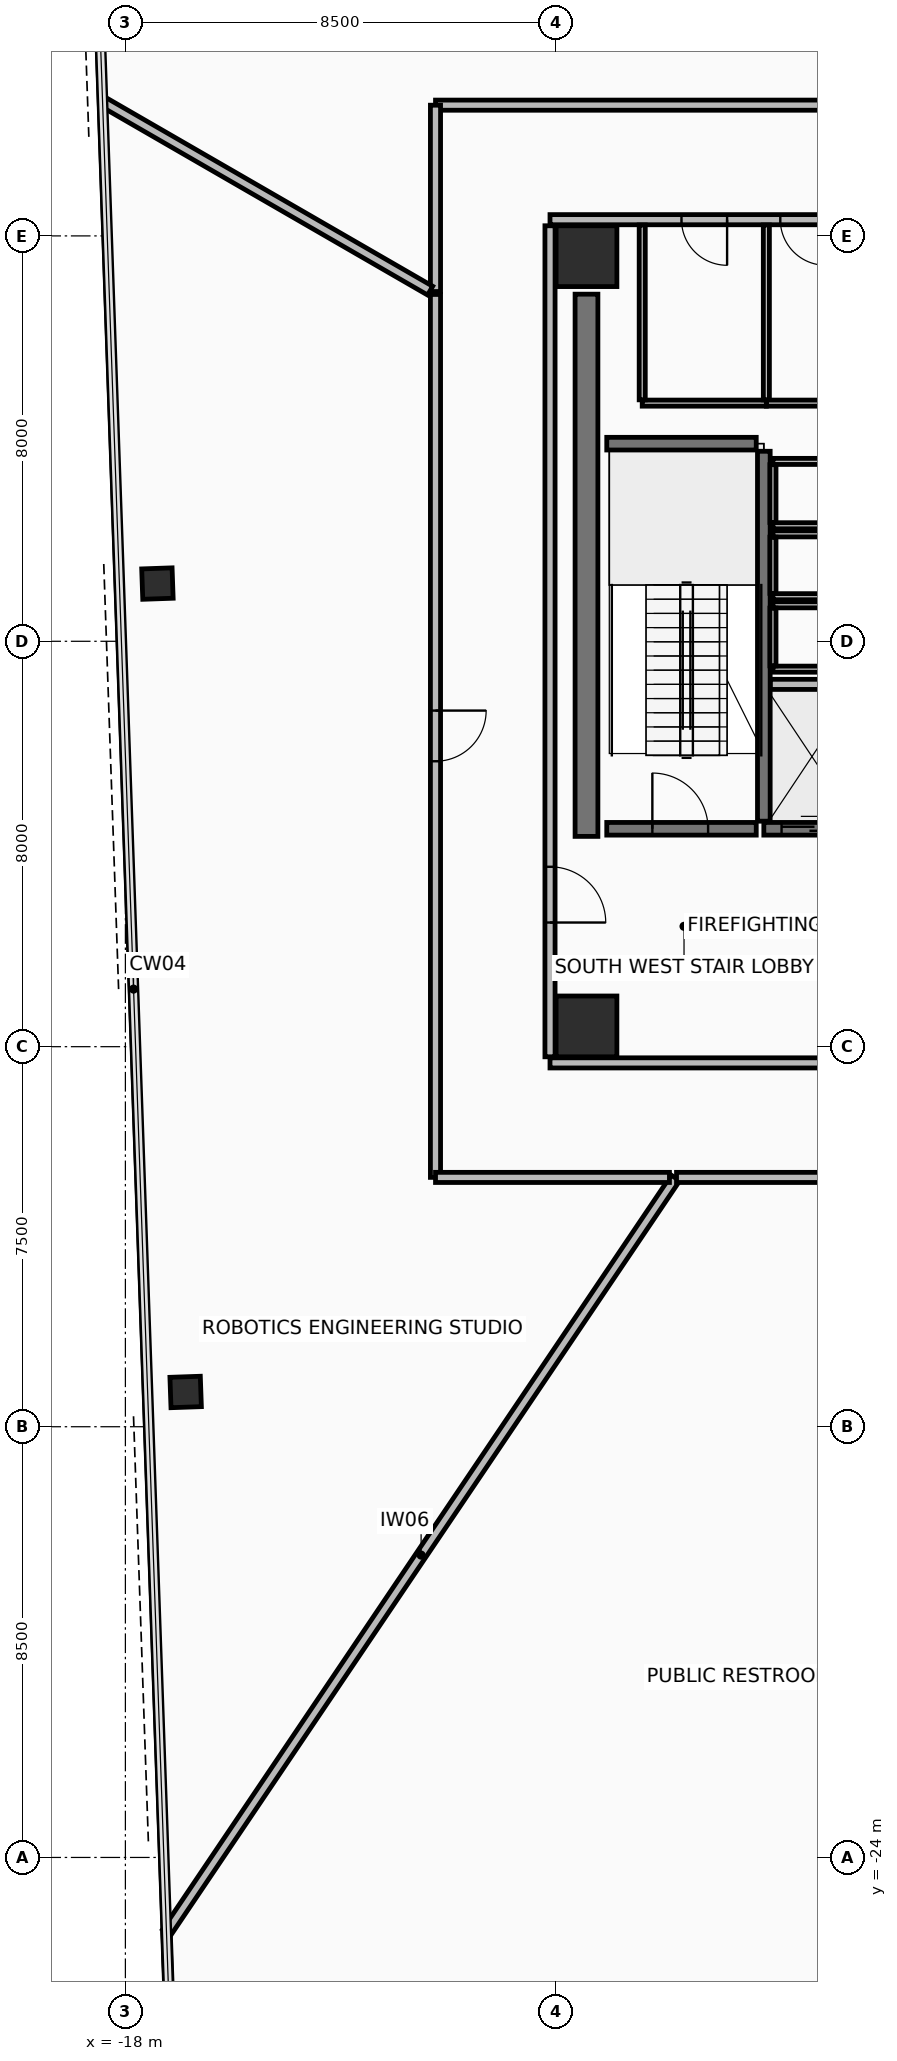
"""IFC4 building model, lengths in metres.
Left out: names, types, materials, properties, quantities, classifications, styles, units other than length and angle.
Written with IfcOpenShell. Run it as: python <this file> out.ifc"""

import sys

from ifc_helpers import new_model, si_unit, direction, frame, frame_2d, origin, origin_2d, place, context, subcontext, project, spatial, rectangle, hollow_rectangle, extrude, element, fill, save


model = new_model("IFC4")
c1 = context("Model", 3, precision=1e-05, world=origin(), true_north=direction((0.0, 1.0)))
c2 = subcontext(c1, "Body", "Model", "MODEL_VIEW")
j1 = project(units=[si_unit("LENGTHUNIT", "METRE"), si_unit("PLANEANGLEUNIT", "RADIAN")], contexts=[c1])
p1 = place(None, origin())
s1 = spatial("IfcSite", under=j1, at=p1, CompositionType="ELEMENT")
p2 = place(p1, origin())
s2 = spatial("IfcBuilding", under=s1, at=p2, CompositionType="ELEMENT")
p3 = place(p2, frame((0.0, 0.0, 160.4)))
s3 = spatial("IfcBuildingStorey", under=s2, at=p3, CompositionType="ELEMENT", Elevation=160.4)
for number, where, z_axis, x_axis in (
    (1, (-8.9, -7.6, 0.0), (0.0, 0.0, 1.0), (1.0, 0.0, 0.0)),
    (2, (-8.9, 7.6, 0.0), (0.0, 0.0, 1.0), (1.0, 0.0, 0.0)),
):
    element("IfcColumn", number, at=place(p3, frame(where, z_axis=z_axis, x_axis=x_axis)), inside=s3, PredefinedType="COLUMN", context=c2, shape_type="SweptSolid", body=[
        extrude(rectangle(XDim=1.2, YDim=1.2, at=origin_2d()), origin(), (0.0, 0.0, 1.0), 4.75),
    ])
for number, where, z_axis, x_axis in (
    (3, (-17.368, 1.139, 0.0), (0.0, 0.0, 1.0), (-0.035, 0.999, 0.0)),
    (4, (-16.811, -14.814, 0.0), (0.0, 0.0, 1.0), (-0.035, 0.999, 0.0)),
):
    element("IfcColumn", number, at=place(p3, frame(where, z_axis=z_axis, x_axis=x_axis)), inside=s3, PredefinedType="COLUMN", context=c2, shape_type="SweptSolid", body=[
        extrude(hollow_rectangle(XDim=0.6, YDim=0.6, WallThickness=0.036, at=origin_2d()), origin(), (0.0, 0.0, 1.0), 4.75),
    ])
p4 = place(p3, frame((-8.9, -3.85, 0.0), z_axis=(0.0, 0.0, 1.0), x_axis=(0.0, 1.0, 0.0)))
e5 = element("IfcWall", 5, at=p4, inside=s3, PredefinedType="SHEAR", context=c2, shape_type="SweptSolid", body=[
    extrude(rectangle(XDim=10.7, YDim=0.45, at=frame_2d((5.35, 0.0))), origin(), (0.0, 0.0, 1.0), 4.555),
])
p5 = place(p3, frame((-9.62, -8.32, 0.0), z_axis=(0.0, 0.0, 1.0), x_axis=(1.0, 0.0, 0.0)))
e6 = element("IfcWall", 6, at=p5, inside=s3, PredefinedType="PARTITIONING", context=c2, shape_type="SweptSolid", body=[
    extrude(rectangle(XDim=19.24, YDim=0.2, at=frame_2d((9.62, 0.0))), origin(), (0.0, 0.0, 1.0), 2.35),
])
p6 = place(p5, frame((8.57, 0.0, 0.0)))
e7 = element("IfcOpeningElement", 7, at=p6, cuts=e6, PredefinedType="OPENING", context=c2, shape_type="SweptSolid", body=[
    extrude(rectangle(XDim=0.9, YDim=2.1, at=frame_2d((0.45, 1.05))), frame((0.0, 0.11, 0.0), z_axis=(0.0, -1.0, 0.0), x_axis=(1.0, 0.0, 0.0)), (0.0, 0.0, 1.0), 0.22),
])
p7 = place(p5, frame((14.045, 0.0, 0.0)))
e8 = element("IfcOpeningElement", 8, at=p7, cuts=e6, PredefinedType="OPENING", context=c2, shape_type="SweptSolid", body=[
    extrude(rectangle(XDim=0.9, YDim=2.1, at=frame_2d((0.45, 1.05))), frame((0.0, 0.11, 0.0), z_axis=(0.0, -1.0, 0.0), x_axis=(1.0, 0.0, 0.0)), (0.0, 0.0, 1.0), 0.22),
])
p8 = place(p5, frame((15.995, 0.0, 0.0)))
e9 = element("IfcOpeningElement", 9, at=p8, cuts=e6, PredefinedType="OPENING", context=c2, shape_type="SweptSolid", body=[
    extrude(rectangle(XDim=0.9, YDim=2.1, at=frame_2d((0.45, 1.05))), frame((0.0, 0.11, 0.0), z_axis=(0.0, -1.0, 0.0), x_axis=(1.0, 0.0, 0.0)), (0.0, 0.0, 1.0), 0.22),
])
p9 = place(p3, frame((9.62, 8.32, 0.0), z_axis=(0.0, 0.0, 1.0), x_axis=(-1.0, 0.0, 0.0)))
e10 = element("IfcWall", 10, at=p9, inside=s3, PredefinedType="PARTITIONING", context=c2, shape_type="SweptSolid", body=[
    extrude(rectangle(XDim=19.24, YDim=0.2, at=frame_2d((9.62, 0.0))), origin(), (0.0, 0.0, 1.0), 2.75),
])
p10 = place(p9, frame((15.745, 0.0, 0.0)))
e11 = element("IfcOpeningElement", 11, at=p10, cuts=e10, PredefinedType="OPENING", context=c2, shape_type="SweptSolid", body=[
    extrude(rectangle(XDim=0.9, YDim=2.1, at=frame_2d((0.45, 1.05))), frame((0.0, 0.11, 0.0), z_axis=(0.0, -1.0, 0.0), x_axis=(1.0, 0.0, 0.0)), (0.0, 0.0, 1.0), 0.22),
])
p11 = place(p9, frame((13.795, 0.0, 0.0)))
e12 = element("IfcOpeningElement", 12, at=p11, cuts=e10, PredefinedType="OPENING", context=c2, shape_type="SweptSolid", body=[
    extrude(rectangle(XDim=0.9, YDim=2.1, at=frame_2d((0.45, 1.05))), frame((0.0, 0.11, 0.0), z_axis=(0.0, -1.0, 0.0), x_axis=(1.0, 0.0, 0.0)), (0.0, 0.0, 1.0), 0.22),
])
p12 = place(p3, frame((-9.62, 8.2, 0.0), z_axis=(0.0, 0.0, 1.0), x_axis=(0.0, -1.0, 0.0)))
e13 = element("IfcWall", 13, at=p12, inside=s3, PredefinedType="PARTITIONING", context=c2, shape_type="SweptSolid", body=[
    extrude(rectangle(XDim=16.4, YDim=0.2, at=frame_2d((8.2, 0.0))), origin(), (0.0, 0.0, 1.0), 2.75),
])
p13 = place(p12, frame((12.65, 0.0, 0.0)))
e14 = element("IfcOpeningElement", 14, at=p13, cuts=e13, PredefinedType="OPENING", context=c2, shape_type="SweptSolid", body=[
    extrude(rectangle(XDim=1.1, YDim=2.15, at=frame_2d((0.55, 1.075))), frame((0.0, 0.11, 0.0), z_axis=(0.0, -1.0, 0.0), x_axis=(1.0, 0.0, 0.0)), (0.0, 0.0, 1.0), 0.22),
])
p14 = place(p3, frame((-5.4, -3.55, 0.0), z_axis=(0.0, 0.0, 1.0), x_axis=(0.0, 1.0, 0.0)))
e15 = element("IfcWall", 15, at=p14, inside=s3, PredefinedType="SHEAR", context=c2, shape_type="SweptSolid", body=[
    extrude(rectangle(XDim=7.3, YDim=0.25, at=frame_2d((3.65, 0.0))), origin(), (0.0, 0.0, 1.0), 4.555),
])
p15 = place(p3, frame((-8.5, -3.7, 0.0), z_axis=(0.0, 0.0, 1.0), x_axis=(1.0, 0.0, 0.0)))
e16 = element("IfcWall", 16, at=p15, inside=s3, PredefinedType="SHEAR", context=c2, shape_type="SweptSolid", body=[
    extrude(rectangle(XDim=2.95, YDim=0.25, at=frame_2d((1.475, 0.0))), origin(), (0.0, 0.0, 1.0), 4.555),
])
p16 = place(p15, frame((0.9, 0.0, 0.0)))
e17 = element("IfcOpeningElement", 17, at=p16, cuts=e16, PredefinedType="OPENING", context=c2, shape_type="SweptSolid", body=[
    extrude(rectangle(XDim=1.1, YDim=2.15, at=frame_2d((0.55, 1.075))), frame((0.0, 0.135, 0.0), z_axis=(0.0, -1.0, 0.0), x_axis=(1.0, 0.0, 0.0)), (0.0, 0.0, 1.0), 0.27),
])
p17 = place(p3, frame((-8.5, 3.9, 0.0), z_axis=(0.0, 0.0, 1.0), x_axis=(1.0, 0.0, 0.0)))
e18 = element("IfcWall", 18, at=p17, inside=s3, PredefinedType="SHEAR", context=c2, shape_type="SweptSolid", body=[
    extrude(rectangle(XDim=2.95, YDim=0.25, at=frame_2d((1.475, 0.0))), origin(), (0.0, 0.0, 1.0), 4.555),
])
p18 = place(p3, frame((-5.4, -3.7, 0.0), z_axis=(0.0, 0.0, 1.0), x_axis=(1.0, 0.0, 0.0)))
e19 = element("IfcWall", 19, at=p18, inside=s3, PredefinedType="SHEAR", context=c2, shape_type="SweptSolid", body=[
    extrude(rectangle(XDim=1.9, YDim=0.25, at=frame_2d((0.95, 0.0))), origin(), (0.0, 0.0, 1.0), 4.555),
])
p19 = place(p18, frame((0.35, 0.0, 0.0)))
e20 = element("IfcOpeningElement", 20, at=p19, cuts=e19, PredefinedType="OPENING", context=c2, shape_type="SweptSolid", body=[
    extrude(rectangle(XDim=1.2, YDim=2.2, at=frame_2d((0.6, 1.1))), frame((0.0, 0.135, 0.0), z_axis=(0.0, -1.0, 0.0), x_axis=(1.0, 0.0, 0.0)), (0.0, 0.0, 1.0), 0.27),
])
p20 = place(p3, frame((-5.27, -0.85, 0.0), z_axis=(0.0, 0.0, 1.0), x_axis=(1.0, 0.0, 0.0)))
e21 = element("IfcWall", 21, at=p20, inside=s3, PredefinedType="PARTITIONING", context=c2, shape_type="SweptSolid", body=[
    extrude(rectangle(XDim=1.77, YDim=0.2, at=frame_2d((0.885, 0.0))), origin(), (0.0, 0.0, 1.0), 4.555),
])
p21 = place(p3, frame((-5.22, 2.28, 0.0), z_axis=(0.0, 0.0, 1.0), x_axis=(1.0, 0.0, 0.0)))
e22 = element("IfcWall", 22, at=p21, inside=s3, PredefinedType="PARTITIONING", context=c2, shape_type="SweptSolid", body=[
    extrude(rectangle(XDim=3.47, YDim=0.12, at=frame_2d((1.735, 0.0))), origin(), (0.0, 0.0, 1.0), 4.555),
])
p22 = place(p3, frame((-1.815, 3.55, 0.0), z_axis=(0.0, 0.0, 1.0), x_axis=(-1.0, 0.0, 0.0)))
e23 = element("IfcWall", 23, at=p22, inside=s3, PredefinedType="PARTITIONING", context=c2, shape_type="SweptSolid", body=[
    extrude(rectangle(XDim=3.405, YDim=0.12, at=frame_2d((1.703, 0.0))), origin(), (0.0, 0.0, 1.0), 4.555),
])
p23 = place(p3, frame((-5.22, 3.485, 0.0), z_axis=(0.0, 0.0, 1.0), x_axis=(0.0, -1.0, 0.0)))
e24 = element("IfcWall", 24, at=p23, inside=s3, PredefinedType="PARTITIONING", context=c2, shape_type="SweptSolid", body=[
    extrude(rectangle(XDim=1.14, YDim=0.12, at=frame_2d((0.57, 0.0))), origin(), (0.0, 0.0, 1.0), 4.555),
])
p24 = place(p3, frame((-5.22, 0.88, 0.0), z_axis=(0.0, 0.0, 1.0), x_axis=(1.0, 0.0, 0.0)))
e25 = element("IfcWall", 25, at=p24, inside=s3, PredefinedType="PARTITIONING", context=c2, shape_type="SweptSolid", body=[
    extrude(rectangle(XDim=3.47, YDim=0.12, at=frame_2d((1.735, 0.0))), origin(), (0.0, 0.0, 1.0), 4.555),
])
p25 = place(p3, frame((-1.815, 2.12, 0.0), z_axis=(0.0, 0.0, 1.0), x_axis=(-1.0, 0.0, 0.0)))
e26 = element("IfcWall", 26, at=p25, inside=s3, PredefinedType="PARTITIONING", context=c2, shape_type="SweptSolid", body=[
    extrude(rectangle(XDim=3.405, YDim=0.12, at=frame_2d((1.703, 0.0))), origin(), (0.0, 0.0, 1.0), 4.555),
])
p26 = place(p3, frame((-5.22, 2.055, 0.0), z_axis=(0.0, 0.0, 1.0), x_axis=(0.0, -1.0, 0.0)))
e27 = element("IfcWall", 27, at=p26, inside=s3, PredefinedType="PARTITIONING", context=c2, shape_type="SweptSolid", body=[
    extrude(rectangle(XDim=1.11, YDim=0.12, at=frame_2d((0.555, 0.0))), origin(), (0.0, 0.0, 1.0), 4.555),
])
p27 = place(p3, frame((-5.22, -0.55, 0.0), z_axis=(0.0, 0.0, 1.0), x_axis=(1.0, 0.0, 0.0)))
e28 = element("IfcWall", 28, at=p27, inside=s3, PredefinedType="PARTITIONING", context=c2, shape_type="SweptSolid", body=[
    extrude(rectangle(XDim=2.77, YDim=0.12, at=frame_2d((1.385, 0.0))), origin(), (0.0, 0.0, 1.0), 4.555),
])
p28 = place(p3, frame((-2.515, 0.72, 0.0), z_axis=(0.0, 0.0, 1.0), x_axis=(-1.0, 0.0, 0.0)))
e29 = element("IfcWall", 29, at=p28, inside=s3, PredefinedType="PARTITIONING", context=c2, shape_type="SweptSolid", body=[
    extrude(rectangle(XDim=2.705, YDim=0.12, at=frame_2d((1.353, 0.0))), origin(), (0.0, 0.0, 1.0), 4.555),
])
p29 = place(p3, frame((-5.22, 0.655, 0.0), z_axis=(0.0, 0.0, 1.0), x_axis=(0.0, -1.0, 0.0)))
e30 = element("IfcWall", 30, at=p29, inside=s3, PredefinedType="PARTITIONING", context=c2, shape_type="SweptSolid", body=[
    extrude(rectangle(XDim=1.14, YDim=0.12, at=frame_2d((0.57, 0.0))), origin(), (0.0, 0.0, 1.0), 4.555),
])
p30 = place(p3, frame((-7.8, 4.7, 0.0), z_axis=(0.0, 0.0, 1.0), x_axis=(1.0, 0.0, 0.0)))
e31 = element("IfcWall", 31, at=p30, inside=s3, PredefinedType="PARTITIONING", context=c2, shape_type="SweptSolid", body=[
    extrude(rectangle(XDim=2.45, YDim=0.12, at=frame_2d((1.225, 0.0))), origin(), (0.0, 0.0, 1.0), 4.555),
])
for number, where, z_axis, x_axis in (
    (32, (-5.35, 4.765, 0.0), (0.0, 0.0, 1.0), (0.0, 1.0, 0.0)),
    (33, (-7.8, 8.215, 0.0), (0.0, 0.0, 1.0), (0.0, -1.0, 0.0)),
):
    element("IfcWall", number, at=place(p3, frame(where, z_axis=z_axis, x_axis=x_axis)), inside=s3, PredefinedType="PARTITIONING", context=c2, shape_type="SweptSolid", body=[
        extrude(rectangle(XDim=3.45, YDim=0.12, at=frame_2d((1.725, 0.0))), origin(), (0.0, 0.0, 1.0), 3.75),
    ])
p31 = place(p3, frame((-5.35, 4.7, 0.0), z_axis=(0.0, 0.0, 1.0), x_axis=(1.0, 0.0, 0.0)))
e34 = element("IfcWall", 34, at=p31, inside=s3, PredefinedType="PARTITIONING", context=c2, shape_type="SweptSolid", body=[
    extrude(rectangle(XDim=1.45, YDim=0.12, at=frame_2d((0.725, 0.0))), origin(), (0.0, 0.0, 1.0), 4.555),
])
p32 = place(p3, frame((-16.964, -31.913, 0.0), z_axis=(0.0, 0.0, 1.0), x_axis=(-0.034878400824, 0.99939156348, 0.0)))
e35 = element("IfcWall", 35, at=p32, inside=s3, PredefinedType="PARTITIONING", context=c2, shape_type="SweptSolid", body=[
    extrude(rectangle(XDim=6.426, YDim=0.15, at=frame_2d((3.213, 0.0))), origin(), (0.0, 0.0, 1.0), 4.555),
])
p33 = place(p3, frame((-17.184, -25.476, 0.0), z_axis=(0.0, 0.0, 1.0), x_axis=(0.559194919571, 0.829036212675, 0.0)))
e36 = element("IfcWall", 36, at=p33, inside=s3, PredefinedType="PARTITIONING", context=c2, shape_type="SweptSolid", body=[
    extrude(rectangle(XDim=17.955, YDim=0.2, at=frame_2d((8.978, 0.0))), origin(), (0.0, 0.0, 1.0), 2.25),
])
p34 = place(p3, frame((-7.123, -10.58, 0.0), z_axis=(0.0, 0.0, 1.0), x_axis=(1.0, 0.0, 0.0)))
e37 = element("IfcWall", 37, at=p34, inside=s3, PredefinedType="PARTITIONING", context=c2, shape_type="SweptSolid", body=[
    extrude(rectangle(XDim=19.002, YDim=0.2, at=frame_2d((9.501, 0.0))), origin(), (0.0, 0.0, 1.0), 2.35),
])
p35 = place(p34, frame((9.076, 0.0, 0.0)))
e38 = element("IfcOpeningElement", 38, at=p35, cuts=e37, PredefinedType="OPENING", context=c2, shape_type="SweptSolid", body=[
    extrude(rectangle(XDim=0.85, YDim=2.1, at=frame_2d((0.425, 1.05))), frame((0.0, 0.11, 0.0), z_axis=(0.0, -1.0, 0.0), x_axis=(1.0, 0.0, 0.0)), (0.0, 0.0, 1.0), 0.22),
])
p36 = place(p3, frame((18.33, -14.454, 0.0), z_axis=(0.0, 0.0, 1.0), x_axis=(-0.848050291152, -0.52991575149, 0.0)))
e39 = element("IfcWall", 39, at=p36, inside=s3, PredefinedType="PARTITIONING", context=c2, shape_type="SweptSolid", body=[
    extrude(rectangle(XDim=36.933, YDim=0.15, at=frame_2d((18.467, 0.0))), origin(), (0.0, 0.0, 1.0), 2.35),
])
p37 = place(p3, frame((5.145, 10.58, 0.0), z_axis=(0.0, 0.0, 1.0), x_axis=(-1.0, 0.0, 0.0)))
e40 = element("IfcWall", 40, at=p37, inside=s3, PredefinedType="PARTITIONING", context=c2, shape_type="SweptSolid", body=[
    extrude(rectangle(XDim=17.024, YDim=0.2, at=frame_2d((8.512, 0.0))), origin(), (0.0, 0.0, 1.0), 2.75),
])
p38 = place(p37, frame((8.012, 0.0, 0.0)))
e41 = element("IfcOpeningElement", 41, at=p38, cuts=e40, PredefinedType="OPENING", context=c2, shape_type="SweptSolid", body=[
    extrude(rectangle(XDim=1.0, YDim=2.15, at=frame_2d((0.5, 1.075))), frame((0.0, 0.11, 0.0), z_axis=(0.0, -1.0, 0.0), x_axis=(1.0, 0.0, 0.0)), (0.0, 0.0, 1.0), 0.22),
])
p39 = place(p3, frame((-11.88, 10.579, 0.0), z_axis=(0.0, 0.0, 1.0), x_axis=(0.0, -1.0, 0.0)))
e42 = element("IfcWall", 42, at=p39, inside=s3, PredefinedType="PARTITIONING", context=c2, shape_type="SweptSolid", body=[
    extrude(rectangle(XDim=3.677, YDim=0.2, at=frame_2d((1.839, 0.0))), origin(), (0.0, 0.0, 1.0), 2.75),
])
p40 = place(p3, frame((-11.985, 6.92, 0.0), z_axis=(0.0, 0.0, 1.0), x_axis=(-0.866026817719, 0.499997550986, 0.0)))
e43 = element("IfcWall", 43, at=p40, inside=s3, PredefinedType="PARTITIONING", context=c2, shape_type="SweptSolid", body=[
    extrude(rectangle(XDim=7.452, YDim=0.2, at=frame_2d((3.726, 0.0))), origin(), (0.0, 0.0, 1.0), 2.25),
])
p41 = place(p3, frame((-11.88, 6.844, 0.0), z_axis=(0.0, 0.0, 1.0), x_axis=(0.0, -1.0, 0.0)))
e44 = element("IfcWall", 44, at=p41, inside=s3, PredefinedType="PARTITIONING", context=c2, shape_type="SweptSolid", body=[
    extrude(rectangle(XDim=17.424, YDim=0.2, at=frame_2d((8.712, 0.0))), origin(), (0.0, 0.0, 1.0), 2.75),
])
p42 = place(p41, frame((8.212, 0.0, 0.0)))
e45 = element("IfcOpeningElement", 45, at=p42, cuts=e44, PredefinedType="OPENING", context=c2, shape_type="SweptSolid", body=[
    extrude(rectangle(XDim=1.0, YDim=2.15, at=frame_2d((0.5, 1.075))), frame((0.0, 0.11, 0.0), z_axis=(0.0, -1.0, 0.0), x_axis=(1.0, 0.0, 0.0)), (0.0, 0.0, 1.0), 0.22),
])
p43 = place(p3, frame((-11.879, -10.58, 0.0), z_axis=(0.0, 0.0, 1.0), x_axis=(1.0, 0.0, 0.0)))
e46 = element("IfcWall", 46, at=p43, inside=s3, PredefinedType="PARTITIONING", context=c2, shape_type="SweptSolid", body=[
    extrude(rectangle(XDim=4.616, YDim=0.2, at=frame_2d((2.308, 0.0))), origin(), (0.0, 0.0, 1.0), 2.35),
])
p44 = place(p13, frame((1.1, 0.0, 0.0), z_axis=(0.0, 0.0, 1.0), x_axis=(-1.0, 0.0, 0.0)))
e47 = element("IfcDoor", 47, at=p44, inside=s3, OperationType="SINGLE_SWING_LEFT", PredefinedType="DOOR", context=c2, shape_type="SweptSolid", body=[
    extrude(rectangle(XDim=1.1, YDim=2.15, at=frame_2d((0.55, 1.075))), frame((0.0, 0.025, 0.0), z_axis=(0.0, -1.0, 0.0), x_axis=(1.0, 0.0, 0.0)), (0.0, 0.0, 1.0), 0.05),
])
fill(e14, e47)
p45 = place(p16, origin())
e48 = element("IfcDoor", 48, at=p45, inside=s3, OperationType="SINGLE_SWING_LEFT", PredefinedType="DOOR", context=c2, shape_type="SweptSolid", body=[
    extrude(rectangle(XDim=1.1, YDim=2.15, at=frame_2d((0.55, 1.075))), frame((0.0, 0.025, 0.0), z_axis=(0.0, -1.0, 0.0), x_axis=(1.0, 0.0, 0.0)), (0.0, 0.0, 1.0), 0.05),
])
fill(e17, e48)
p46 = place(p19, origin())
e49 = element("IfcDoor", 49, at=p46, inside=s3, OperationType="SLIDING_TO_RIGHT", PredefinedType="DOOR", context=c2, shape_type="SweptSolid", body=[
    extrude(rectangle(XDim=1.2, YDim=2.2, at=frame_2d((0.6, 1.1))), frame((0.0, 0.025, 0.0), z_axis=(0.0, -1.0, 0.0), x_axis=(1.0, 0.0, 0.0)), (0.0, 0.0, 1.0), 0.05),
])
fill(e20, e49)
p47 = place(p10, origin())
e50 = element("IfcDoor", 50, at=p47, inside=s3, OperationType="SINGLE_SWING_LEFT", PredefinedType="DOOR", context=c2, shape_type="SweptSolid", body=[
    extrude(rectangle(XDim=0.9, YDim=2.1, at=frame_2d((0.45, 1.05))), frame((0.0, 0.025, 0.0), z_axis=(0.0, -1.0, 0.0), x_axis=(1.0, 0.0, 0.0)), (0.0, 0.0, 1.0), 0.05),
])
fill(e11, e50)
p48 = place(p11, origin())
e51 = element("IfcDoor", 51, at=p48, inside=s3, OperationType="SINGLE_SWING_LEFT", PredefinedType="DOOR", context=c2, shape_type="SweptSolid", body=[
    extrude(rectangle(XDim=0.9, YDim=2.1, at=frame_2d((0.45, 1.05))), frame((0.0, 0.025, 0.0), z_axis=(0.0, -1.0, 0.0), x_axis=(1.0, 0.0, 0.0)), (0.0, 0.0, 1.0), 0.05),
])
fill(e12, e51)
p49 = place(p42, origin())
e52 = element("IfcDoor", 52, at=p49, inside=s3, OperationType="SINGLE_SWING_RIGHT", PredefinedType="DOOR", context=c2, shape_type="SweptSolid", body=[
    extrude(rectangle(XDim=1.0, YDim=2.15, at=frame_2d((0.5, 1.075))), frame((0.0, 0.025, 0.0), z_axis=(0.0, -1.0, 0.0), x_axis=(1.0, 0.0, 0.0)), (0.0, 0.0, 1.0), 0.05),
])
fill(e45, e52)
save(model, sys.argv[1])
